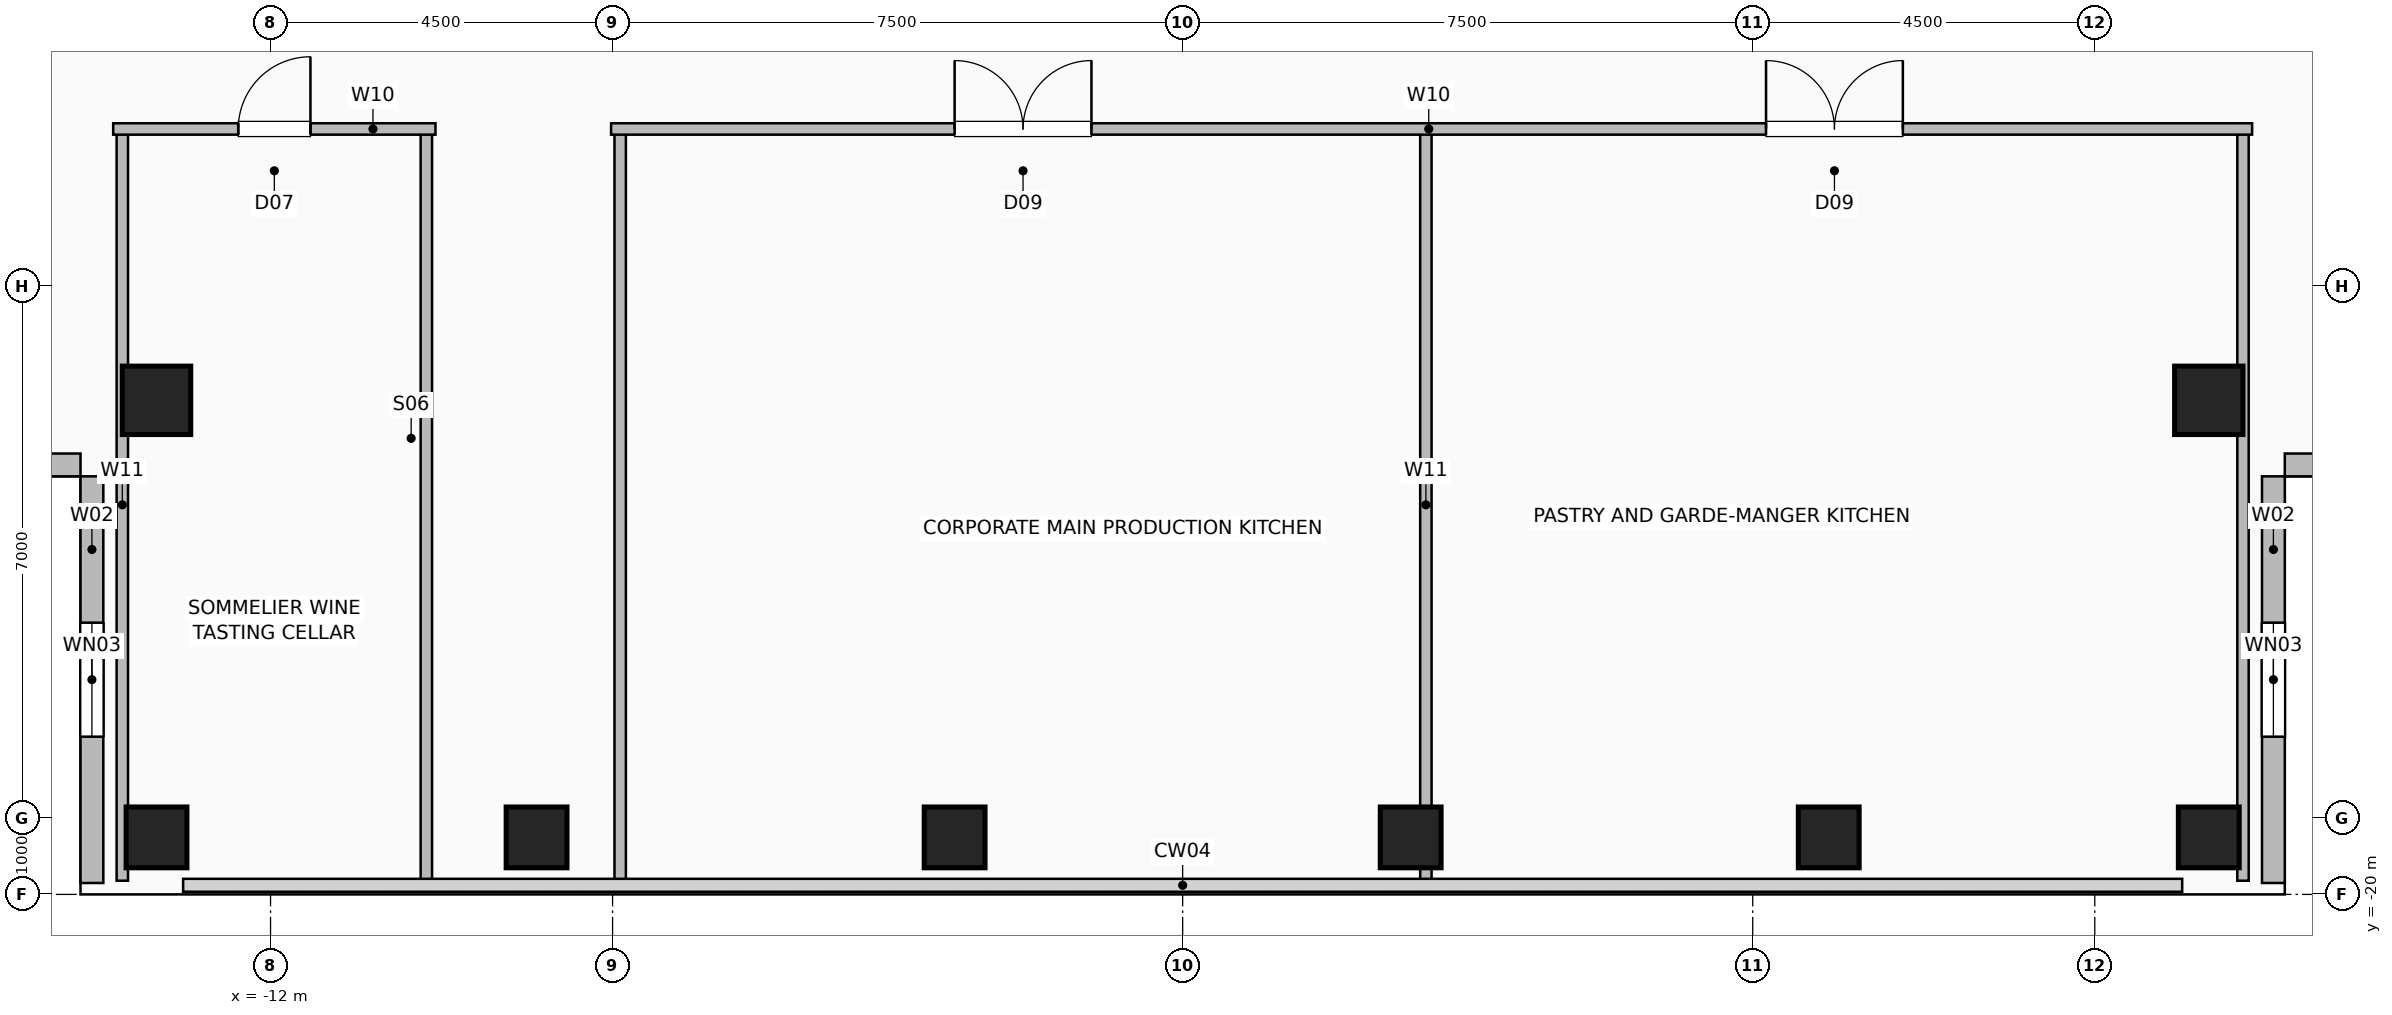
"""IFC4 building model, lengths in metres.
Left out: names, types, materials, properties, quantities, classifications, styles, units other than length and angle.
Written with IfcOpenShell. Run it as: python <this file> out.ifc"""

import sys

from ifc_helpers import new_model, si_unit, direction, frame, frame_2d, origin, origin_2d, place, context, subcontext, project, spatial, rectangle, hollow_rectangle, extrude, element, fill, save


model = new_model("IFC4")
c1 = context("Model", 3, precision=1e-05, world=origin(), true_north=direction((0.0, 1.0)))
c2 = subcontext(c1, "Body", "Model", "MODEL_VIEW")
j1 = project(units=[si_unit("LENGTHUNIT", "METRE"), si_unit("PLANEANGLEUNIT", "RADIAN")], contexts=[c1])
p1 = place(None, origin())
s1 = spatial("IfcSite", under=j1, at=p1, CompositionType="ELEMENT")
p2 = place(p1, origin())
s2 = spatial("IfcBuilding", under=s1, at=p2, CompositionType="ELEMENT")
p3 = place(p2, frame((0.0, 0.0, 198.6)))
s3 = spatial("IfcBuildingStorey", under=s2, at=p3, CompositionType="ELEMENT", Elevation=198.6)
for number, where, z_axis, x_axis in (
    (1, (-13.5, -19.25, 0.0), (0.0, 0.0, 1.0), (1.0, 0.0, 0.0)),
    (2, (-8.5, -19.25, 0.0), (0.0, 0.0, 1.0), (1.0, 0.0, 0.0)),
    (3, (-3.0, -19.25, 0.0), (0.0, 0.0, 1.0), (1.0, 0.0, 0.0)),
    (4, (3.0, -19.25, 0.0), (0.0, 0.0, 1.0), (1.0, 0.0, 0.0)),
    (5, (8.5, -19.25, 0.0), (0.0, 0.0, 1.0), (1.0, 0.0, 0.0)),
    (6, (13.5, -19.25, 0.0), (0.0, 0.0, 1.0), (1.0, 0.0, 0.0)),
):
    element("IfcColumn", number, at=place(p3, frame(where, z_axis=z_axis, x_axis=x_axis)), inside=s3, PredefinedType="COLUMN", context=c2, shape_type="SweptSolid", body=[
        extrude(hollow_rectangle(XDim=0.8, YDim=0.8, WallThickness=0.04, at=origin_2d()), origin(), (0.0, 0.0, 1.0), 3.6),
    ])
for number, where, z_axis, x_axis in (
    (7, (-13.5, -13.5, 0.0), (0.0, 0.0, 1.0), (1.0, 0.0, 0.0)),
    (8, (13.5, -13.5, 0.0), (0.0, 0.0, 1.0), (1.0, 0.0, 0.0)),
):
    element("IfcColumn", number, at=place(p3, frame(where, z_axis=z_axis, x_axis=x_axis)), inside=s3, PredefinedType="COLUMN", context=c2, shape_type="SweptSolid", body=[
        extrude(hollow_rectangle(XDim=0.9, YDim=0.9, WallThickness=0.045, at=origin_2d()), origin(), (0.0, 0.0, 1.0), 3.6),
    ])
p4 = place(p3, frame((-14.35, -19.85, 0.0), z_axis=(0.0, 0.0, 1.0), x_axis=(0.0, 1.0, 0.0)))
e9 = element("IfcWall", 9, at=p4, inside=s3, PredefinedType="SOLIDWALL", context=c2, shape_type="SweptSolid", body=[
    extrude(rectangle(XDim=5.35, YDim=0.3, at=frame_2d((2.675, 0.0))), origin(), (0.0, 0.0, 1.0), 3.36),
])
p5 = place(p4, frame((1.925, 0.0, 0.9)))
e10 = element("IfcOpeningElement", 10, at=p5, cuts=e9, PredefinedType="OPENING", context=c2, shape_type="SweptSolid", body=[
    extrude(rectangle(XDim=1.5, YDim=1.8, at=frame_2d((0.75, 0.9))), frame((0.0, 0.16, 0.0), z_axis=(0.0, -1.0, 0.0), x_axis=(1.0, 0.0, 0.0)), (0.0, 0.0, 1.0), 0.32),
])
p6 = place(p3, frame((-19.85, -14.35, 0.0), z_axis=(0.0, 0.0, 1.0), x_axis=(1.0, 0.0, 0.0)))
e11 = element("IfcWall", 11, at=p6, inside=s3, PredefinedType="SOLIDWALL", context=c2, shape_type="SweptSolid", body=[
    extrude(rectangle(XDim=5.35, YDim=0.3, at=frame_2d((2.675, 0.0))), origin(), (0.0, 0.0, 1.0), 3.36),
])
p7 = place(p3, frame((14.35, -19.85, 0.0), z_axis=(0.0, 0.0, 1.0), x_axis=(0.0, 1.0, 0.0)))
e12 = element("IfcWall", 12, at=p7, inside=s3, PredefinedType="SOLIDWALL", context=c2, shape_type="SweptSolid", body=[
    extrude(rectangle(XDim=5.35, YDim=0.3, at=frame_2d((2.675, 0.0))), origin(), (0.0, 0.0, 1.0), 3.36),
])
p8 = place(p7, frame((1.925, 0.0, 0.9)))
e13 = element("IfcOpeningElement", 13, at=p8, cuts=e12, PredefinedType="OPENING", context=c2, shape_type="SweptSolid", body=[
    extrude(rectangle(XDim=1.5, YDim=1.8, at=frame_2d((0.75, 0.9))), frame((0.0, 0.16, 0.0), z_axis=(0.0, -1.0, 0.0), x_axis=(1.0, 0.0, 0.0)), (0.0, 0.0, 1.0), 0.32),
])
p9 = place(p3, frame((19.85, -14.35, 0.0), z_axis=(0.0, 0.0, 1.0), x_axis=(-1.0, 0.0, 0.0)))
e14 = element("IfcWall", 14, at=p9, inside=s3, PredefinedType="SOLIDWALL", context=c2, shape_type="SweptSolid", body=[
    extrude(rectangle(XDim=5.35, YDim=0.3, at=frame_2d((2.675, 0.0))), origin(), (0.0, 0.0, 1.0), 3.36),
])
for number, where, z_axis, x_axis in (
    (15, (-13.95, -19.82, 0.0), (0.0, 0.0, 1.0), (0.0, 1.0, 0.0)),
    (16, (-9.95, -19.82, 0.0), (0.0, 0.0, 1.0), (0.0, 1.0, 0.0)),
):
    element("IfcWall", number, at=place(p3, frame(where, z_axis=z_axis, x_axis=x_axis)), inside=s3, PredefinedType="PARTITIONING", context=c2, shape_type="SweptSolid", body=[
        extrude(rectangle(XDim=9.89, YDim=0.15, at=frame_2d((4.945, 0.0))), origin(), (0.0, 0.0, 1.0), 3.36),
    ])
p10 = place(p3, frame((-14.07, -9.93, 0.0), z_axis=(0.0, 0.0, 1.0), x_axis=(1.0, 0.0, 0.0)))
e17 = element("IfcWall", 17, at=p10, inside=s3, PredefinedType="PARTITIONING", context=c2, shape_type="SweptSolid", body=[
    extrude(rectangle(XDim=4.24, YDim=0.15, at=frame_2d((2.12, 0.0))), origin(), (0.0, 0.0, 1.0), 3.36),
])
p11 = place(p10, frame((1.645, 0.0, 0.0)))
e18 = element("IfcOpeningElement", 18, at=p11, cuts=e17, PredefinedType="OPENING", context=c2, shape_type="SweptSolid", body=[
    extrude(rectangle(XDim=0.95, YDim=2.06, at=frame_2d((0.475, 1.03))), frame((0.0, 0.085, 0.0), z_axis=(0.0, -1.0, 0.0), x_axis=(1.0, 0.0, 0.0)), (0.0, 0.0, 1.0), 0.17),
])
for number, where, z_axis, x_axis in (
    (19, (-7.4, -19.82, 0.0), (0.0, 0.0, 1.0), (0.0, 1.0, 0.0)),
    (20, (3.2, -19.82, 0.0), (0.0, 0.0, 1.0), (0.0, 1.0, 0.0)),
    (21, (13.95, -19.82, 0.0), (0.0, 0.0, 1.0), (0.0, 1.0, 0.0)),
):
    element("IfcWall", number, at=place(p3, frame(where, z_axis=z_axis, x_axis=x_axis)), inside=s3, PredefinedType="PARTITIONING", context=c2, shape_type="SweptSolid", body=[
        extrude(rectangle(XDim=9.89, YDim=0.15, at=frame_2d((4.945, 0.0))), origin(), (0.0, 0.0, 1.0), 3.36),
    ])
p12 = place(p3, frame((-7.52, -9.93, 0.0), z_axis=(0.0, 0.0, 1.0), x_axis=(1.0, 0.0, 0.0)))
e22 = element("IfcWall", 22, at=p12, inside=s3, PredefinedType="PARTITIONING", context=c2, shape_type="SweptSolid", body=[
    extrude(rectangle(XDim=21.59, YDim=0.15, at=frame_2d((10.795, 0.0))), origin(), (0.0, 0.0, 1.0), 3.36),
])
p13 = place(p12, frame((4.52, 0.0, 0.0)))
e23 = element("IfcOpeningElement", 23, at=p13, cuts=e22, PredefinedType="OPENING", context=c2, shape_type="SweptSolid", body=[
    extrude(rectangle(XDim=1.8, YDim=2.08, at=frame_2d((0.9, 1.04))), frame((0.0, 0.085, 0.0), z_axis=(0.0, -1.0, 0.0), x_axis=(1.0, 0.0, 0.0)), (0.0, 0.0, 1.0), 0.17),
])
p14 = place(p12, frame((15.195, 0.0, 0.0)))
e24 = element("IfcOpeningElement", 24, at=p14, cuts=e22, PredefinedType="OPENING", context=c2, shape_type="SweptSolid", body=[
    extrude(rectangle(XDim=1.8, YDim=2.08, at=frame_2d((0.9, 1.04))), frame((0.0, 0.085, 0.0), z_axis=(0.0, -1.0, 0.0), x_axis=(1.0, 0.0, 0.0)), (0.0, 0.0, 1.0), 0.17),
])
p15 = place(p5, origin())
e25 = element("IfcWindow", 25, at=p15, inside=s3, PartitioningType="SINGLE_PANEL", PredefinedType="WINDOW", context=c2, shape_type="SweptSolid", body=[
    extrude(rectangle(XDim=1.5, YDim=1.8, at=frame_2d((0.75, 0.9))), frame((0.0, 0.03, 0.0), z_axis=(0.0, -1.0, 0.0), x_axis=(1.0, 0.0, 0.0)), (0.0, 0.0, 1.0), 0.06),
])
fill(e10, e25)
p16 = place(p8, origin())
e26 = element("IfcWindow", 26, at=p16, inside=s3, PartitioningType="SINGLE_PANEL", PredefinedType="WINDOW", context=c2, shape_type="SweptSolid", body=[
    extrude(rectangle(XDim=1.5, YDim=1.8, at=frame_2d((0.75, 0.9))), frame((0.0, 0.03, 0.0), z_axis=(0.0, -1.0, 0.0), x_axis=(1.0, 0.0, 0.0)), (0.0, 0.0, 1.0), 0.06),
])
fill(e13, e26)
p17 = place(p11, origin())
e27 = element("IfcDoor", 27, at=p17, inside=s3, OperationType="SINGLE_SWING_RIGHT", PredefinedType="DOOR", context=c2, shape_type="SweptSolid", body=[
    extrude(rectangle(XDim=0.95, YDim=2.06, at=frame_2d((0.475, 1.03))), frame((0.0, 0.025, 0.0), z_axis=(0.0, -1.0, 0.0), x_axis=(1.0, 0.0, 0.0)), (0.0, 0.0, 1.0), 0.05),
])
fill(e18, e27)
p18 = place(p13, origin())
e28 = element("IfcDoor", 28, at=p18, inside=s3, OperationType="DOUBLE_DOOR_SINGLE_SWING", PredefinedType="DOOR", context=c2, shape_type="SweptSolid", body=[
    extrude(rectangle(XDim=1.8, YDim=2.08, at=frame_2d((0.9, 1.04))), frame((0.0, 0.025, 0.0), z_axis=(0.0, -1.0, 0.0), x_axis=(1.0, 0.0, 0.0)), (0.0, 0.0, 1.0), 0.05),
])
fill(e23, e28)
p19 = place(p14, origin())
e29 = element("IfcDoor", 29, at=p19, inside=s3, OperationType="DOUBLE_DOOR_SINGLE_SWING", PredefinedType="DOOR", context=c2, shape_type="SweptSolid", body=[
    extrude(rectangle(XDim=1.8, YDim=2.08, at=frame_2d((0.9, 1.04))), frame((0.0, 0.025, 0.0), z_axis=(0.0, -1.0, 0.0), x_axis=(1.0, 0.0, 0.0)), (0.0, 0.0, 1.0), 0.05),
])
fill(e24, e29)
save(model, sys.argv[1])
